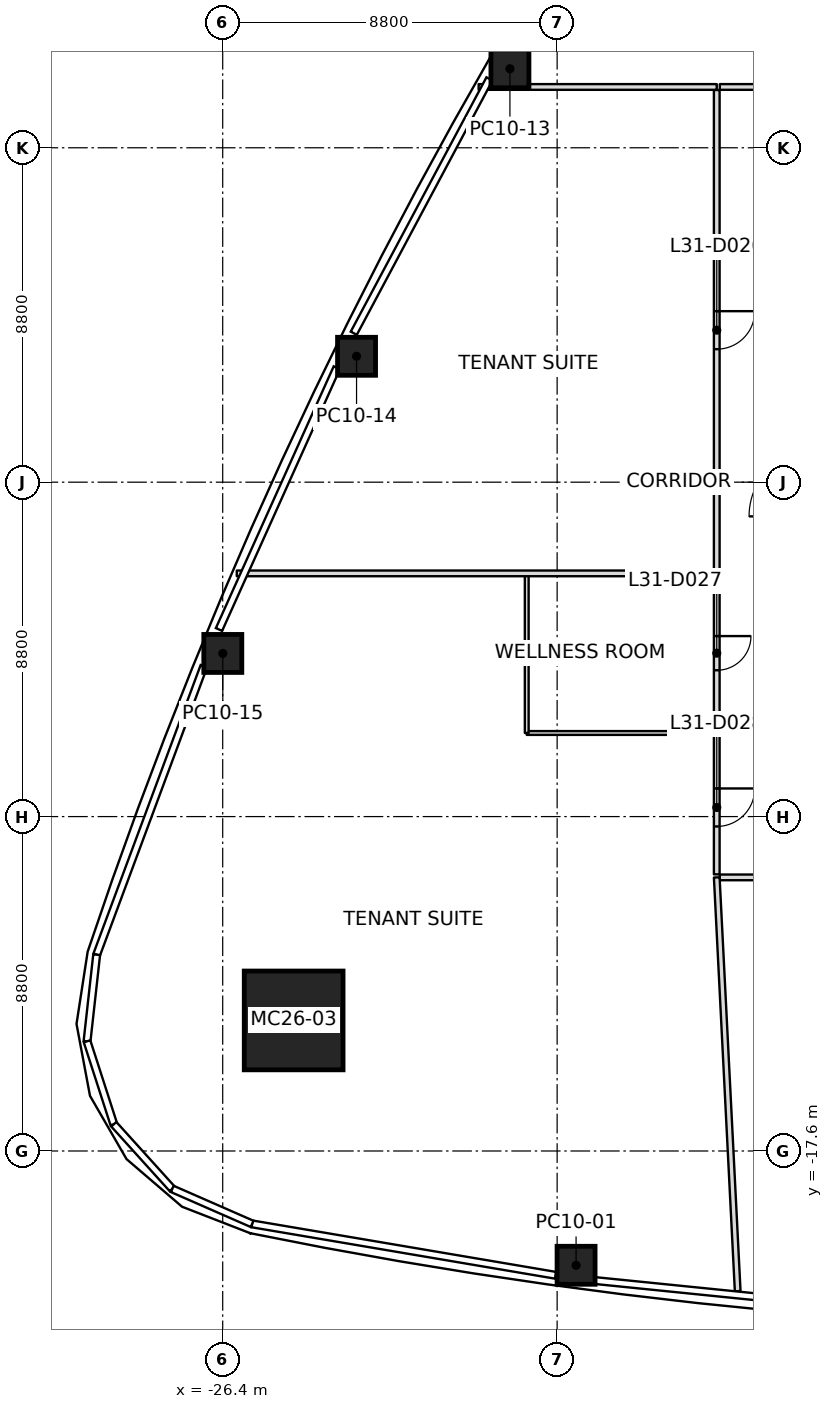
"""IFC4 building model, lengths in metres.
Left out: names, types, materials, properties, quantities, classifications, styles, units other than length and angle.
Written with IfcOpenShell. Run it as: python <this file> out.ifc"""

import sys

from ifc_helpers import new_model, si_unit, direction, frame, frame_2d, origin, origin_2d, place, context, subcontext, project, spatial, rectangle, extrude, element, fill, save


model = new_model("IFC4")
c1 = context("Model", 3, precision=1e-05, world=origin(), true_north=direction((0.0, 1.0)))
c2 = subcontext(c1, "Body", "Model", "MODEL_VIEW")
j1 = project(units=[si_unit("LENGTHUNIT", "METRE"), si_unit("PLANEANGLEUNIT", "RADIAN")], contexts=[c1])
p1 = place(None, origin())
s1 = spatial("IfcSite", under=j1, at=p1, CompositionType="ELEMENT")
p2 = place(p1, origin())
s2 = spatial("IfcBuilding", under=s1, at=p2, CompositionType="ELEMENT")
p3 = place(p2, frame((0.0, 0.0, 145.8)))
s3 = spatial("IfcBuildingStorey", under=s2, at=p3, CompositionType="ELEMENT", Elevation=145.8)
p4 = place(p3, frame((-24.533, -14.164, 0.0), z_axis=(0.02806141744, 0.01622681965, 0.999474485505), x_axis=(0.999606200887, -0.000455526946, -0.028057719863)))
e1 = element("IfcColumn", 1, at=p4, inside=s3, PredefinedType="COLUMN", context=c2, shape_type="SweptSolid", body=[
    extrude(rectangle(XDim=2.6, YDim=2.6, at=origin_2d()), origin(), (0.0, 0.0, 1.0), 4.002),
])
p5 = place(p3, frame((-17.102, -20.607, 0.0), z_axis=(0.017696459735, 0.010434809016, 0.999788952766), x_axis=(-0.990846712505, 0.134023553505, 0.016139374938)))
e2 = element("IfcColumn", 2, at=p5, inside=s3, PredefinedType="COLUMN", context=c2, shape_type="SweptSolid", body=[
    extrude(rectangle(XDim=1.0, YDim=1.0, at=origin_2d()), origin(), (0.0, 0.0, 1.0), 4.001),
])
p6 = place(p3, frame((-18.842, 10.879, 0.0), z_axis=(0.009948074445, -0.005736926367, 0.999934059571), x_axis=(0.499975258342, 0.8660396879, -5.385525e-06)))
e3 = element("IfcColumn", 3, at=p6, inside=s3, PredefinedType="COLUMN", context=c2, shape_type="SweptSolid", body=[
    extrude(rectangle(XDim=1.0, YDim=1.0, at=origin_2d()), origin(), (0.0, 0.0, 1.0), 4.0),
])
p7 = place(p3, frame((-22.878, 3.313, 0.0), z_axis=(0.014158706356, 0.002074982828, 0.999897607498), x_axis=(0.440741161284, 0.897597660168, -0.008103654166)))
e4 = element("IfcColumn", 4, at=p7, inside=s3, PredefinedType="COLUMN", context=c2, shape_type="SweptSolid", body=[
    extrude(rectangle(XDim=1.0, YDim=1.0, at=origin_2d()), origin(), (0.0, 0.0, 1.0), 4.0),
])
p8 = place(p3, frame((-26.397, -4.507, 0.0), z_axis=(0.01794052709, 0.010129685364, 0.999787740954), x_axis=(0.379524247415, 0.925040251516, -0.016182666656)))
e5 = element("IfcColumn", 5, at=p8, inside=s3, PredefinedType="COLUMN", context=c2, shape_type="SweptSolid", body=[
    extrude(rectangle(XDim=1.0, YDim=1.0, at=origin_2d()), origin(), (0.0, 0.0, 1.0), 4.001),
])
p9 = place(p3, frame((-13.4, -2.4, 0.0), z_axis=(0.0, 0.0, 1.0), x_axis=(-1.0, 0.0, 0.0)))
e6 = element("IfcWall", 6, at=p9, inside=s3, PredefinedType="PARTITIONING", context=c2, shape_type="SweptSolid", body=[
    extrude(rectangle(XDim=12.63, YDim=0.15, at=frame_2d((6.315, 0.0))), origin(), (0.0, 0.0, 1.0), 3.234),
])
p10 = place(p3, frame((-13.4, 10.4, 0.0), z_axis=(0.0, 0.0, 1.0), x_axis=(-1.0, 0.0, 0.0)))
e7 = element("IfcWall", 7, at=p10, inside=s3, PredefinedType="PARTITIONING", context=c2, shape_type="SweptSolid", body=[
    extrude(rectangle(XDim=6.265, YDim=0.15, at=frame_2d((3.133, 0.0))), origin(), (0.0, 0.0, 1.0), 3.234),
])
p11 = place(p3, frame((-13.4, -10.4, 0.0), z_axis=(0.0, 0.0, 1.0), x_axis=(0.0505395773, -0.998722058997, 0.0)))
e8 = element("IfcWall", 8, at=p11, inside=s3, PredefinedType="PARTITIONING", context=c2, shape_type="SweptSolid", body=[
    extrude(rectangle(XDim=10.903, YDim=0.15, at=frame_2d((5.451, 0.0))), origin(), (0.0, 0.0, 1.0), 3.234),
])
p12 = place(p3, frame((-13.4, 10.32, 0.0), z_axis=(0.0, 0.0, 1.0), x_axis=(0.0, -1.0, 0.0)))
e9 = element("IfcWall", 9, at=p12, inside=s3, PredefinedType="PARTITIONING", context=c2, shape_type="SweptSolid", body=[
    extrude(rectangle(XDim=20.64, YDim=0.15, at=frame_2d((10.32, 0.0))), origin(), (0.0, 0.0, 1.0), 3.166),
])
p13 = place(p12, frame((5.82, 0.0, 0.0)))
e10 = element("IfcOpeningElement", 10, at=p13, cuts=e9, PredefinedType="OPENING", context=c2, shape_type="SweptSolid", body=[
    extrude(rectangle(XDim=1.0, YDim=2.1, at=frame_2d((0.5, 1.05))), frame((0.0, 0.075, 0.0), z_axis=(0.0, -1.0, 0.0), x_axis=(1.0, 0.0, 0.0)), (0.0, 0.0, 1.0), 0.15),
])
p14 = place(p12, frame((14.37, 0.0, 0.0)))
e11 = element("IfcOpeningElement", 11, at=p14, cuts=e9, PredefinedType="OPENING", context=c2, shape_type="SweptSolid", body=[
    extrude(rectangle(XDim=0.9, YDim=2.1, at=frame_2d((0.45, 1.05))), frame((0.0, 0.075, 0.0), z_axis=(0.0, -1.0, 0.0), x_axis=(1.0, 0.0, 0.0)), (0.0, 0.0, 1.0), 0.15),
])
p15 = place(p12, frame((18.38, 0.0, 0.0)))
e12 = element("IfcOpeningElement", 12, at=p15, cuts=e9, PredefinedType="OPENING", context=c2, shape_type="SweptSolid", body=[
    extrude(rectangle(XDim=1.0, YDim=2.1, at=frame_2d((0.5, 1.05))), frame((0.0, 0.075, 0.0), z_axis=(0.0, -1.0, 0.0), x_axis=(1.0, 0.0, 0.0)), (0.0, 0.0, 1.0), 0.15),
])
p16 = place(p3, frame((-13.32, -10.4, 0.0), z_axis=(0.0, 0.0, 1.0), x_axis=(1.0, 0.0, 0.0)))
e13 = element("IfcWall", 13, at=p16, inside=s3, PredefinedType="PARTITIONING", context=c2, shape_type="SweptSolid", body=[
    extrude(rectangle(XDim=26.64, YDim=0.15, at=frame_2d((13.32, 0.0))), origin(), (0.0, 0.0, 1.0), 3.317),
])
p17 = place(p16, frame((4.82, 0.0, 0.0)))
e14 = element("IfcOpeningElement", 14, at=p17, cuts=e13, PredefinedType="OPENING", context=c2, shape_type="SweptSolid", body=[
    extrude(rectangle(XDim=1.0, YDim=2.1, at=frame_2d((0.5, 1.05))), frame((0.0, 0.075, 0.0), z_axis=(0.0, -1.0, 0.0), x_axis=(1.0, 0.0, 0.0)), (0.0, 0.0, 1.0), 0.15),
])
p18 = place(p16, frame((14.22, 0.0, 0.0)))
e15 = element("IfcOpeningElement", 15, at=p18, cuts=e13, PredefinedType="OPENING", context=c2, shape_type="SweptSolid", body=[
    extrude(rectangle(XDim=1.0, YDim=2.1, at=frame_2d((0.5, 1.05))), frame((0.0, 0.075, 0.0), z_axis=(0.0, -1.0, 0.0), x_axis=(1.0, 0.0, 0.0)), (0.0, 0.0, 1.0), 0.15),
])
p19 = place(p16, frame((22.22, 0.0, 0.0)))
e16 = element("IfcOpeningElement", 16, at=p19, cuts=e13, PredefinedType="OPENING", context=c2, shape_type="SweptSolid", body=[
    extrude(rectangle(XDim=1.0, YDim=2.1, at=frame_2d((0.5, 1.05))), frame((0.0, 0.075, 0.0), z_axis=(0.0, -1.0, 0.0), x_axis=(1.0, 0.0, 0.0)), (0.0, 0.0, 1.0), 0.15),
])
p20 = place(p3, frame((13.32, 10.4, 0.0), z_axis=(0.0, 0.0, 1.0), x_axis=(-1.0, 0.0, 0.0)))
e17 = element("IfcWall", 17, at=p20, inside=s3, PredefinedType="PARTITIONING", context=c2, shape_type="SweptSolid", body=[
    extrude(rectangle(XDim=26.64, YDim=0.15, at=frame_2d((13.32, 0.0))), origin(), (0.0, 0.0, 1.0), 3.166),
])
p21 = place(p20, frame((1.55, 0.0, 0.0)))
e18 = element("IfcOpeningElement", 18, at=p21, cuts=e17, PredefinedType="OPENING", context=c2, shape_type="SweptSolid", body=[
    extrude(rectangle(XDim=0.9, YDim=2.1, at=frame_2d((0.45, 1.05))), frame((0.0, 0.075, 0.0), z_axis=(0.0, -1.0, 0.0), x_axis=(1.0, 0.0, 0.0)), (0.0, 0.0, 1.0), 0.15),
])
p22 = place(p20, frame((6.96, 0.0, 0.0)))
e19 = element("IfcOpeningElement", 19, at=p22, cuts=e17, PredefinedType="OPENING", context=c2, shape_type="SweptSolid", body=[
    extrude(rectangle(XDim=1.0, YDim=2.1, at=frame_2d((0.5, 1.05))), frame((0.0, 0.075, 0.0), z_axis=(0.0, -1.0, 0.0), x_axis=(1.0, 0.0, 0.0)), (0.0, 0.0, 1.0), 0.15),
])
p23 = place(p20, frame((14.22, 0.0, 0.0)))
e20 = element("IfcOpeningElement", 20, at=p23, cuts=e17, PredefinedType="OPENING", context=c2, shape_type="SweptSolid", body=[
    extrude(rectangle(XDim=1.0, YDim=2.1, at=frame_2d((0.5, 1.05))), frame((0.0, 0.075, 0.0), z_axis=(0.0, -1.0, 0.0), x_axis=(1.0, 0.0, 0.0)), (0.0, 0.0, 1.0), 0.15),
])
p24 = place(p20, frame((22.23, 0.0, 0.0)))
e21 = element("IfcOpeningElement", 21, at=p24, cuts=e17, PredefinedType="OPENING", context=c2, shape_type="SweptSolid", body=[
    extrude(rectangle(XDim=1.0, YDim=2.1, at=frame_2d((0.5, 1.05))), frame((0.0, 0.075, 0.0), z_axis=(0.0, -1.0, 0.0), x_axis=(1.0, 0.0, 0.0)), (0.0, 0.0, 1.0), 0.15),
])
p25 = place(p3, frame((-13.43, -6.6, 0.0), z_axis=(0.0, 0.0, 1.0), x_axis=(-1.0, 0.0, 0.0)))
e22 = element("IfcWall", 22, at=p25, inside=s3, PredefinedType="PARTITIONING", context=c2, shape_type="SweptSolid", body=[
    extrude(rectangle(XDim=4.97, YDim=0.1, at=frame_2d((2.485, 0.0))), origin(), (0.0, 0.0, 1.0), 3.247),
])
p26 = place(p3, frame((-18.4, -6.6, 0.0), z_axis=(0.0, 0.0, 1.0), x_axis=(0.0, 1.0, 0.0)))
e23 = element("IfcWall", 23, at=p26, inside=s3, PredefinedType="PARTITIONING", context=c2, shape_type="SweptSolid", body=[
    extrude(rectangle(XDim=4.17, YDim=0.1, at=frame_2d((2.085, 0.0))), origin(), (0.0, 0.0, 1.0), 3.247),
])
p27 = place(p13, origin())
e24 = element("IfcDoor", 24, at=p27, inside=s3, OperationType="SINGLE_SWING_LEFT", PredefinedType="DOOR", context=c2, shape_type="SweptSolid", body=[
    extrude(rectangle(XDim=1.0, YDim=2.1, at=frame_2d((0.5, 1.05))), frame((0.0, 0.025, 0.0), z_axis=(0.0, -1.0, 0.0), x_axis=(1.0, 0.0, 0.0)), (0.0, 0.0, 1.0), 0.05),
])
fill(e10, e24)
p28 = place(p14, origin())
e25 = element("IfcDoor", 25, at=p28, inside=s3, OperationType="SINGLE_SWING_LEFT", PredefinedType="DOOR", context=c2, shape_type="SweptSolid", body=[
    extrude(rectangle(XDim=0.9, YDim=2.1, at=frame_2d((0.45, 1.05))), frame((0.0, 0.025, 0.0), z_axis=(0.0, -1.0, 0.0), x_axis=(1.0, 0.0, 0.0)), (0.0, 0.0, 1.0), 0.05),
])
fill(e11, e25)
p29 = place(p15, origin())
e26 = element("IfcDoor", 26, at=p29, inside=s3, OperationType="SINGLE_SWING_LEFT", PredefinedType="DOOR", context=c2, shape_type="SweptSolid", body=[
    extrude(rectangle(XDim=1.0, YDim=2.1, at=frame_2d((0.5, 1.05))), frame((0.0, 0.025, 0.0), z_axis=(0.0, -1.0, 0.0), x_axis=(1.0, 0.0, 0.0)), (0.0, 0.0, 1.0), 0.05),
])
fill(e12, e26)
save(model, sys.argv[1])
